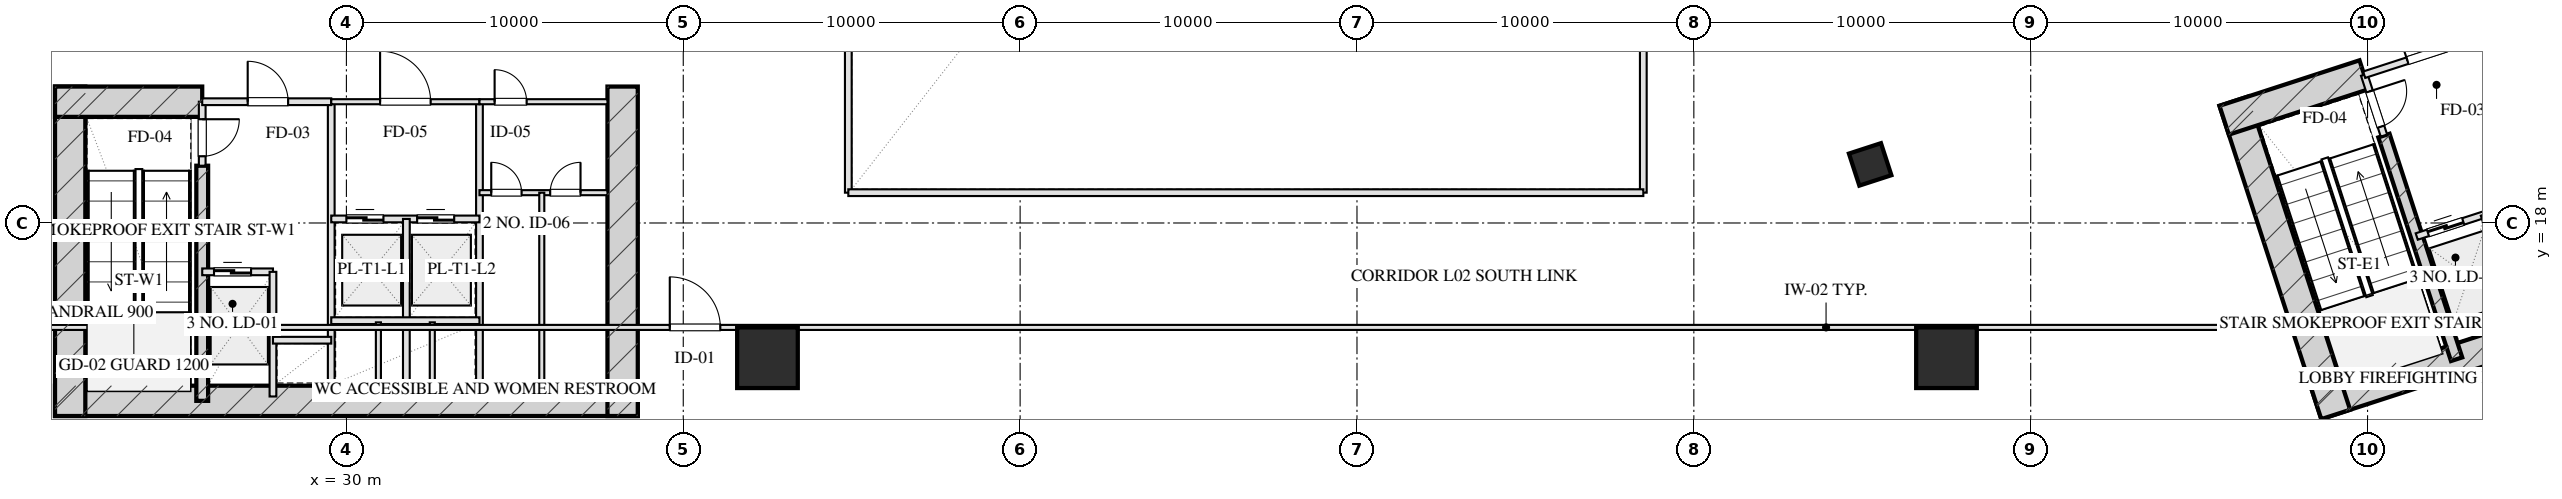
"""IFC4 building model, lengths in metres.
Left out: names, types, materials, properties, quantities, classifications, styles, units other than length and angle.
Written with IfcOpenShell. Run it as: python <this file> out.ifc"""

import sys

from ifc_helpers import new_model, si_unit, direction, frame, frame_2d, origin, origin_2d, place, context, subcontext, project, spatial, rectangle, hollow_rectangle, extrude, element, fill, save


model = new_model("IFC4")
c1 = context("Model", 3, precision=1e-05, world=origin(), true_north=direction((0.0, 1.0)))
c2 = subcontext(c1, "Body", "Model", "MODEL_VIEW")
j1 = project(units=[si_unit("LENGTHUNIT", "METRE"), si_unit("PLANEANGLEUNIT", "RADIAN")], contexts=[c1])
p1 = place(None, origin())
s1 = spatial("IfcSite", under=j1, at=p1, CompositionType="ELEMENT")
p2 = place(p1, origin())
s2 = spatial("IfcBuilding", under=s1, at=p2, CompositionType="ELEMENT")
p3 = place(p2, frame((0.0, 0.0, 11.5)))
s3 = spatial("IfcBuildingStorey", under=s2, at=p3, CompositionType="ELEMENT", Elevation=11.5)
p4 = place(p3, frame((21.35, 12.72, 0.0), z_axis=(0.0, 0.0, 1.0), x_axis=(1.0, 0.0, 0.0)))
e1 = element("IfcWall", 1, at=p4, inside=s3, PredefinedType="SHEAR", context=c2, shape_type="SweptSolid", body=[
    extrude(rectangle(XDim=17.3, YDim=0.9, at=frame_2d((8.65, 0.0))), origin(), (0.0, 0.0, 1.0), 5.0),
])
for number, where, z_axis, x_axis in (
    (2, (21.8, 22.05, 0.0), (0.0, 0.0, 1.0), (0.0, -1.0, 0.0)),
    (3, (38.2, 22.05, 0.0), (0.0, 0.0, 1.0), (0.0, -1.0, 0.0)),
):
    element("IfcWall", number, at=place(p3, frame(where, z_axis=z_axis, x_axis=x_axis)), inside=s3, PredefinedType="SHEAR", context=c2, shape_type="SweptSolid", body=[
        extrude(rectangle(XDim=9.78, YDim=0.9, at=frame_2d((4.89, 0.0))), origin(), (0.0, 0.0, 1.0), 5.0),
    ])
p5 = place(p3, frame((25.72, 19.7, 0.0), z_axis=(0.0, 0.0, 1.0), x_axis=(0.0, -1.0, 0.0)))
e4 = element("IfcWall", 4, at=p5, inside=s3, PredefinedType="SHEAR", context=c2, shape_type="SweptSolid", body=[
    extrude(rectangle(XDim=6.98, YDim=0.35, at=frame_2d((3.49, 0.0))), origin(), (0.0, 0.0, 1.0), 5.0),
])
p6 = place(p3, frame((21.35, 21.6, 0.0), z_axis=(0.0, 0.0, 1.0), x_axis=(1.0, 0.0, 0.0)))
e5 = element("IfcWall", 5, at=p6, inside=s3, PredefinedType="SHEAR", context=c2, shape_type="SweptSolid", body=[
    extrude(rectangle(XDim=4.37, YDim=0.9, at=frame_2d((2.185, 0.0))), origin(), (0.0, 0.0, 1.0), 5.0),
])
p7 = place(p3, frame((88.487, 12.605, 0.0), z_axis=(0.0, 0.0, 1.0), x_axis=(0.951055016115, 0.309021611416, 0.0)))
e6 = element("IfcWall", 6, at=p7, inside=s3, PredefinedType="SHEAR", context=c2, shape_type="SweptSolid", body=[
    extrude(rectangle(XDim=16.7, YDim=0.9, at=frame_2d((8.35, 0.0))), origin(), (0.0, 0.0, 1.0), 5.0),
])
p8 = place(p3, frame((86.032, 21.618, 0.0), z_axis=(0.0, 0.0, 1.0), x_axis=(0.30901438634, -0.951057363693, 0.0)))
e7 = element("IfcWall", 7, at=p8, inside=s3, PredefinedType="SHEAR", context=c2, shape_type="SweptSolid", body=[
    extrude(rectangle(XDim=9.78, YDim=0.9, at=frame_2d((4.89, 0.0))), origin(), (0.0, 0.0, 1.0), 5.0),
])
p9 = place(p3, frame((90.486, 20.594, 0.0), z_axis=(0.0, 0.0, 1.0), x_axis=(0.309020428229, -0.951055400562, 0.0)))
e8 = element("IfcWall", 8, at=p9, inside=s3, PredefinedType="SHEAR", context=c2, shape_type="SweptSolid", body=[
    extrude(rectangle(XDim=6.98, YDim=0.35, at=frame_2d((3.49, 0.0))), origin(), (0.0, 0.0, 1.0), 5.0),
])
p10 = place(p3, frame((85.743, 21.051, 0.0), z_axis=(0.0, 0.0, 1.0), x_axis=(0.951063623806, 0.308995118848, 0.0)))
e9 = element("IfcWall", 9, at=p10, inside=s3, PredefinedType="SHEAR", context=c2, shape_type="SweptSolid", body=[
    extrude(rectangle(XDim=4.37, YDim=0.9, at=frame_2d((2.185, 0.0))), origin(), (0.0, 0.0, 1.0), 5.0),
])
for number, where, z_axis, x_axis in (
    (10, (42.5, 14.0, 0.0), (0.0, 0.0, 1.0), (1.0, 0.0, 0.0)),
    (11, (77.5, 14.0, 0.0), (0.0, 0.0, 1.0), (1.0, 0.0, 0.0)),
):
    element("IfcColumn", number, at=place(p3, frame(where, z_axis=z_axis, x_axis=x_axis)), inside=s3, PredefinedType="COLUMN", context=c2, shape_type="SweptSolid", body=[
        extrude(hollow_rectangle(XDim=1.8, YDim=1.8, WallThickness=0.06, at=origin_2d()), origin(), (0.0, 0.0, 1.0), 5.001),
    ])
p11 = place(p3, frame((75.234, 19.739, 0.0), z_axis=(0.0, 0.0, 1.0), x_axis=(0.951056516295, 0.309016994375, 0.0)))
e12 = element("IfcColumn", 12, at=p11, inside=s3, PredefinedType="COLUMN", context=c2, shape_type="SweptSolid", body=[
    extrude(hollow_rectangle(XDim=1.0, YDim=1.0, WallThickness=0.036, at=origin_2d()), origin(), (0.0, 0.0, 1.0), 5.001),
])
p12 = place(p3, frame((25.72, 21.6, 0.0), z_axis=(0.0, 0.0, 1.0), x_axis=(0.0, -1.0, 0.0)))
e13 = element("IfcWall", 13, at=p12, inside=s3, PredefinedType="PARTITIONING", context=c2, shape_type="SweptSolid", body=[
    extrude(rectangle(XDim=1.9, YDim=0.2, at=frame_2d((0.95, 0.0))), origin(), (0.0, 0.0, 1.0), 4.685),
])
p13 = place(p12, frame((0.52, 0.0, 0.0)))
e14 = element("IfcOpeningElement", 14, at=p13, cuts=e13, PredefinedType="OPENING", context=c2, shape_type="SweptSolid", body=[
    extrude(rectangle(XDim=1.1, YDim=2.05, at=frame_2d((0.55, 1.025))), frame((0.0, 0.11, 0.0), z_axis=(0.0, -1.0, 0.0), x_axis=(1.0, 0.0, 0.0)), (0.0, 0.0, 1.0), 0.22),
])
p14 = place(p3, frame((29.55, 21.6, 0.0), z_axis=(0.0, 0.0, 1.0), x_axis=(0.0, -1.0, 0.0)))
e15 = element("IfcWall", 15, at=p14, inside=s3, PredefinedType="PARTITIONING", context=c2, shape_type="SweptSolid", body=[
    extrude(rectangle(XDim=8.43, YDim=0.2, at=frame_2d((4.215, 0.0))), origin(), (0.0, 0.0, 1.0), 4.685),
])
p15 = place(p3, frame((25.72, 21.6, 0.0), z_axis=(0.0, 0.0, 1.0), x_axis=(1.0, 0.0, 0.0)))
e16 = element("IfcWall", 16, at=p15, inside=s3, PredefinedType="PARTITIONING", context=c2, shape_type="SweptSolid", body=[
    extrude(rectangle(XDim=3.83, YDim=0.2, at=frame_2d((1.915, 0.0))), origin(), (0.0, 0.0, 1.0), 4.685),
])
p16 = place(p15, frame((1.35, 0.0, 0.0)))
e17 = element("IfcOpeningElement", 17, at=p16, cuts=e16, PredefinedType="OPENING", context=c2, shape_type="SweptSolid", body=[
    extrude(rectangle(XDim=1.2, YDim=2.05, at=frame_2d((0.6, 1.025))), frame((0.0, 0.11, 0.0), z_axis=(0.0, -1.0, 0.0), x_axis=(1.0, 0.0, 0.0)), (0.0, 0.0, 1.0), 0.22),
])
p17 = place(p3, frame((25.72, 16.55, 0.0), z_axis=(0.0, 0.0, 1.0), x_axis=(1.0, 0.0, 0.0)))
e18 = element("IfcWall", 18, at=p17, inside=s3, PredefinedType="PARTITIONING", context=c2, shape_type="SweptSolid", body=[
    extrude(rectangle(XDim=2.1, YDim=0.2, at=frame_2d((1.05, 0.0))), origin(), (0.0, 0.0, 1.0), 4.685),
])
p18 = place(p17, frame((0.35, 0.0, 0.0)))
e19 = element("IfcOpeningElement", 19, at=p18, cuts=e18, PredefinedType="OPENING", context=c2, shape_type="SweptSolid", body=[
    extrude(rectangle(XDim=1.1, YDim=2.05, at=frame_2d((0.55, 1.025))), frame((0.0, 0.11, 0.0), z_axis=(0.0, -1.0, 0.0), x_axis=(1.0, 0.0, 0.0)), (0.0, 0.0, 1.0), 0.22),
])
p19 = place(p3, frame((27.82, 16.55, 0.0), z_axis=(0.0, 0.0, 1.0), x_axis=(0.0, -1.0, 0.0)))
e20 = element("IfcWall", 20, at=p19, inside=s3, PredefinedType="PARTITIONING", context=c2, shape_type="SweptSolid", body=[
    extrude(rectangle(XDim=3.7, YDim=0.2, at=frame_2d((1.85, 0.0))), origin(), (0.0, 0.0, 1.0), 4.685),
])
p20 = place(p3, frame((27.82, 14.52, 0.0), z_axis=(0.0, 0.0, 1.0), x_axis=(1.0, 0.0, 0.0)))
e21 = element("IfcWall", 21, at=p20, inside=s3, PredefinedType="PARTITIONING", context=c2, shape_type="SweptSolid", body=[
    extrude(rectangle(XDim=1.73, YDim=0.2, at=frame_2d((0.865, 0.0))), origin(), (0.0, 0.0, 1.0), 4.685),
])
p21 = place(p3, frame((33.95, 21.6, 0.0), z_axis=(0.0, 0.0, 1.0), x_axis=(0.0, -1.0, 0.0)))
e22 = element("IfcWall", 22, at=p21, inside=s3, PredefinedType="PARTITIONING", context=c2, shape_type="SweptSolid", body=[
    extrude(rectangle(XDim=8.43, YDim=0.2, at=frame_2d((4.215, 0.0))), origin(), (0.0, 0.0, 1.0), 4.685),
])
p22 = place(p3, frame((29.55, 21.6, 0.0), z_axis=(0.0, 0.0, 1.0), x_axis=(1.0, 0.0, 0.0)))
e23 = element("IfcWall", 23, at=p22, inside=s3, PredefinedType="PARTITIONING", context=c2, shape_type="SweptSolid", body=[
    extrude(rectangle(XDim=4.4, YDim=0.15, at=frame_2d((2.2, 0.0))), origin(), (0.0, 0.0, 1.0), 4.685),
])
p23 = place(p22, frame((1.45, 0.0, 0.0)))
e24 = element("IfcOpeningElement", 24, at=p23, cuts=e23, PredefinedType="OPENING", context=c2, shape_type="SweptSolid", body=[
    extrude(rectangle(XDim=1.5, YDim=2.05, at=frame_2d((0.75, 1.025))), frame((0.0, 0.085, 0.0), z_axis=(0.0, -1.0, 0.0), x_axis=(1.0, 0.0, 0.0)), (0.0, 0.0, 1.0), 0.17),
])
p24 = place(p3, frame((29.55, 18.12, 0.0), z_axis=(0.0, 0.0, 1.0), x_axis=(1.0, 0.0, 0.0)))
e25 = element("IfcWall", 25, at=p24, inside=s3, PredefinedType="PARTITIONING", context=c2, shape_type="SweptSolid", body=[
    extrude(rectangle(XDim=4.4, YDim=0.2, at=frame_2d((2.2, 0.0))), origin(), (0.0, 0.0, 1.0), 4.685),
])
p25 = place(p24, frame((0.45, 0.0, 0.0)))
e26 = element("IfcOpeningElement", 26, at=p25, cuts=e25, PredefinedType="OPENING", context=c2, shape_type="SweptSolid", body=[
    extrude(rectangle(XDim=1.1, YDim=2.05, at=frame_2d((0.55, 1.025))), frame((0.0, 0.11, 0.0), z_axis=(0.0, -1.0, 0.0), x_axis=(1.0, 0.0, 0.0)), (0.0, 0.0, 1.0), 0.22),
])
p26 = place(p24, frame((2.55, 0.0, 0.0)))
e27 = element("IfcOpeningElement", 27, at=p26, cuts=e25, PredefinedType="OPENING", context=c2, shape_type="SweptSolid", body=[
    extrude(rectangle(XDim=1.1, YDim=2.05, at=frame_2d((0.55, 1.025))), frame((0.0, 0.11, 0.0), z_axis=(0.0, -1.0, 0.0), x_axis=(1.0, 0.0, 0.0)), (0.0, 0.0, 1.0), 0.22),
])
p27 = place(p3, frame((31.78, 18.12, 0.0), z_axis=(0.0, 0.0, 1.0), x_axis=(0.0, -1.0, 0.0)))
e28 = element("IfcWall", 28, at=p27, inside=s3, PredefinedType="PARTITIONING", context=c2, shape_type="SweptSolid", body=[
    extrude(rectangle(XDim=4.95, YDim=0.2, at=frame_2d((2.475, 0.0))), origin(), (0.0, 0.0, 1.0), 4.685),
])
p28 = place(p3, frame((29.55, 15.1, 0.0), z_axis=(0.0, 0.0, 1.0), x_axis=(1.0, 0.0, 0.0)))
e29 = element("IfcWall", 29, at=p28, inside=s3, PredefinedType="PARTITIONING", context=c2, shape_type="SweptSolid", body=[
    extrude(rectangle(XDim=4.4, YDim=0.2, at=frame_2d((2.2, 0.0))), origin(), (0.0, 0.0, 1.0), 4.685),
])
for number, where, z_axis, x_axis in (
    (30, (30.95, 15.05, 0.0), (0.0, 0.0, 1.0), (0.0, -1.0, 0.0)),
    (31, (32.55, 15.05, 0.0), (0.0, 0.0, 1.0), (0.0, -1.0, 0.0)),
):
    element("IfcWall", number, at=place(p3, frame(where, z_axis=z_axis, x_axis=x_axis)), inside=s3, PredefinedType="PARTITIONING", context=c2, shape_type="SweptSolid", body=[
        extrude(rectangle(XDim=1.88, YDim=0.15, at=frame_2d((0.94, 0.0))), origin(), (0.0, 0.0, 1.0), 4.685),
    ])
p29 = place(p3, frame((33.95, 21.6, 0.0), z_axis=(0.0, 0.0, 1.0), x_axis=(1.0, 0.0, 0.0)))
e32 = element("IfcWall", 32, at=p29, inside=s3, PredefinedType="PARTITIONING", context=c2, shape_type="SweptSolid", body=[
    extrude(rectangle(XDim=3.8, YDim=0.15, at=frame_2d((1.9, 0.0))), origin(), (0.0, 0.0, 1.0), 4.685),
])
p30 = place(p29, frame((0.45, 0.0, 0.0)))
e33 = element("IfcOpeningElement", 33, at=p30, cuts=e32, PredefinedType="OPENING", context=c2, shape_type="SweptSolid", body=[
    extrude(rectangle(XDim=0.95, YDim=2.05, at=frame_2d((0.475, 1.025))), frame((0.0, 0.085, 0.0), z_axis=(0.0, -1.0, 0.0), x_axis=(1.0, 0.0, 0.0)), (0.0, 0.0, 1.0), 0.17),
])
p31 = place(p3, frame((33.95, 18.9, 0.0), z_axis=(0.0, 0.0, 1.0), x_axis=(1.0, 0.0, 0.0)))
e34 = element("IfcWall", 34, at=p31, inside=s3, PredefinedType="PARTITIONING", context=c2, shape_type="SweptSolid", body=[
    extrude(rectangle(XDim=3.8, YDim=0.15, at=frame_2d((1.9, 0.0))), origin(), (0.0, 0.0, 1.0), 4.685),
])
p32 = place(p31, frame((0.35, 0.0, 0.0)))
e35 = element("IfcOpeningElement", 35, at=p32, cuts=e34, PredefinedType="OPENING", context=c2, shape_type="SweptSolid", body=[
    extrude(rectangle(XDim=0.9, YDim=2.05, at=frame_2d((0.45, 1.025))), frame((0.0, 0.085, 0.0), z_axis=(0.0, -1.0, 0.0), x_axis=(1.0, 0.0, 0.0)), (0.0, 0.0, 1.0), 0.17),
])
p33 = place(p31, frame((2.1, 0.0, 0.0)))
e36 = element("IfcOpeningElement", 36, at=p33, cuts=e34, PredefinedType="OPENING", context=c2, shape_type="SweptSolid", body=[
    extrude(rectangle(XDim=0.9, YDim=2.05, at=frame_2d((0.45, 1.025))), frame((0.0, 0.085, 0.0), z_axis=(0.0, -1.0, 0.0), x_axis=(1.0, 0.0, 0.0)), (0.0, 0.0, 1.0), 0.17),
])
p34 = place(p3, frame((35.8, 18.9, 0.0), z_axis=(0.0, 0.0, 1.0), x_axis=(0.0, -1.0, 0.0)))
e37 = element("IfcWall", 37, at=p34, inside=s3, PredefinedType="PARTITIONING", context=c2, shape_type="SweptSolid", body=[
    extrude(rectangle(XDim=5.73, YDim=0.15, at=frame_2d((2.865, 0.0))), origin(), (0.0, 0.0, 1.0), 4.685),
])
p35 = place(p3, frame((89.899, 22.401, 0.0), z_axis=(0.0, 0.0, 1.0), x_axis=(0.308932062672, -0.951084108086, 0.0)))
e38 = element("IfcWall", 38, at=p35, inside=s3, PredefinedType="PARTITIONING", context=c2, shape_type="SweptSolid", body=[
    extrude(rectangle(XDim=1.9, YDim=0.2, at=frame_2d((0.95, 0.0))), origin(), (0.0, 0.0, 1.0), 4.685),
])
p36 = place(p35, frame((0.52, 0.0, 0.0)))
e39 = element("IfcOpeningElement", 39, at=p36, cuts=e38, PredefinedType="OPENING", context=c2, shape_type="SweptSolid", body=[
    extrude(rectangle(XDim=1.1, YDim=2.05, at=frame_2d((0.55, 1.025))), frame((0.0, 0.11, 0.0), z_axis=(0.0, -1.0, 0.0), x_axis=(1.0, 0.0, 0.0)), (0.0, 0.0, 1.0), 0.22),
])
p37 = place(p3, frame((89.899, 22.401, 0.0), z_axis=(0.0, 0.0, 1.0), x_axis=(0.951046716504, 0.309047153403, 0.0)))
e40 = element("IfcWall", 40, at=p37, inside=s3, PredefinedType="PARTITIONING", context=c2, shape_type="SweptSolid", body=[
    extrude(rectangle(XDim=3.83, YDim=0.2, at=frame_2d((1.915, 0.0))), origin(), (0.0, 0.0, 1.0), 4.685),
])
p38 = place(p37, frame((1.35, 0.0, 0.0)))
e41 = element("IfcOpeningElement", 41, at=p38, cuts=e40, PredefinedType="OPENING", context=c2, shape_type="SweptSolid", body=[
    extrude(rectangle(XDim=1.2, YDim=2.05, at=frame_2d((0.6, 1.025))), frame((0.0, 0.11, 0.0), z_axis=(0.0, -1.0, 0.0), x_axis=(1.0, 0.0, 0.0)), (0.0, 0.0, 1.0), 0.22),
])
p39 = place(p3, frame((91.46, 17.598, 0.0), z_axis=(0.0, 0.0, 1.0), x_axis=(0.951062257173, 0.308999325213, 0.0)))
e42 = element("IfcWall", 42, at=p39, inside=s3, PredefinedType="PARTITIONING", context=c2, shape_type="SweptSolid", body=[
    extrude(rectangle(XDim=2.1, YDim=0.2, at=frame_2d((1.05, 0.0))), origin(), (0.0, 0.0, 1.0), 4.685),
])
p40 = place(p39, frame((0.35, 0.0, 0.0)))
e43 = element("IfcOpeningElement", 43, at=p40, cuts=e42, PredefinedType="OPENING", context=c2, shape_type="SweptSolid", body=[
    extrude(rectangle(XDim=1.1, YDim=2.05, at=frame_2d((0.55, 1.025))), frame((0.0, 0.11, 0.0), z_axis=(0.0, -1.0, 0.0), x_axis=(1.0, 0.0, 0.0)), (0.0, 0.0, 1.0), 0.22),
])
p41 = place(p3, frame((93.457, 18.247, 0.0), z_axis=(0.0, 0.0, 1.0), x_axis=(0.3089935693, -0.951064127245, 0.0)))
e44 = element("IfcWall", 44, at=p41, inside=s3, PredefinedType="PARTITIONING", context=c2, shape_type="SweptSolid", body=[
    extrude(rectangle(XDim=3.7, YDim=0.2, at=frame_2d((1.85, 0.0))), origin(), (0.0, 0.0, 1.0), 4.685),
])
for number, where, z_axis, x_axis in (
    (45, (44.9, 18.9, 0.0), (0.0, 0.0, 1.0), (0.0, 1.0, 0.0)),
    (46, (68.5, 18.9, 0.0), (0.0, 0.0, 1.0), (0.0, 1.0, 0.0)),
):
    element("IfcWall", number, at=place(p3, frame(where, z_axis=z_axis, x_axis=x_axis)), inside=s3, PredefinedType="PARTITIONING", context=c2, shape_type="SweptSolid", body=[
        extrude(rectangle(XDim=30.2, YDim=0.2, at=frame_2d((15.1, 0.0))), origin(), (0.0, 0.0, 1.0), 4.685),
    ])
p42 = place(p3, frame((44.9, 18.9, 0.0), z_axis=(0.0, 0.0, 1.0), x_axis=(1.0, 0.0, 0.0)))
e47 = element("IfcWall", 47, at=p42, inside=s3, PredefinedType="PARTITIONING", context=c2, shape_type="SweptSolid", body=[
    extrude(rectangle(XDim=23.6, YDim=0.2, at=frame_2d((11.8, 0.0))), origin(), (0.0, 0.0, 1.0), 4.685),
])
p43 = place(p3, frame((18.0, 14.9, 0.0), z_axis=(0.0, 0.0, 1.0), x_axis=(1.0, 0.0, 0.0)))
e48 = element("IfcWall", 48, at=p43, inside=s3, PredefinedType="PARTITIONING", context=c2, shape_type="SweptSolid", body=[
    extrude(rectangle(XDim=88.0, YDim=0.15, at=frame_2d((44.0, 0.0))), origin(), (0.0, 0.0, 1.0), 2.15),
])
p44 = place(p43, frame((21.6, 0.0, 0.0)))
e49 = element("IfcOpeningElement", 49, at=p44, cuts=e48, PredefinedType="OPENING", context=c2, shape_type="SweptSolid", body=[
    extrude(rectangle(XDim=1.5, YDim=2.05, at=frame_2d((0.75, 1.025))), frame((0.0, 0.085, 0.0), z_axis=(0.0, -1.0, 0.0), x_axis=(1.0, 0.0, 0.0)), (0.0, 0.0, 1.0), 0.17),
])
p45 = place(p13, origin())
e50 = element("IfcDoor", 50, at=p45, inside=s3, OperationType="SINGLE_SWING_LEFT", PredefinedType="DOOR", context=c2, shape_type="SweptSolid", body=[
    extrude(rectangle(XDim=1.1, YDim=2.05, at=frame_2d((0.55, 1.025))), frame((0.0, 0.025, 0.0), z_axis=(0.0, -1.0, 0.0), x_axis=(1.0, 0.0, 0.0)), (0.0, 0.0, 1.0), 0.05),
])
fill(e14, e50)
p46 = place(p16, origin())
e51 = element("IfcDoor", 51, at=p46, inside=s3, OperationType="SINGLE_SWING_LEFT", PredefinedType="DOOR", context=c2, shape_type="SweptSolid", body=[
    extrude(rectangle(XDim=1.2, YDim=2.05, at=frame_2d((0.6, 1.025))), frame((0.0, 0.025, 0.0), z_axis=(0.0, -1.0, 0.0), x_axis=(1.0, 0.0, 0.0)), (0.0, 0.0, 1.0), 0.05),
])
fill(e17, e51)
p47 = place(p18, origin())
e52 = element("IfcDoor", 52, at=p47, inside=s3, OperationType="DOUBLE_DOOR_SLIDING", PredefinedType="DOOR", context=c2, shape_type="SweptSolid", body=[
    extrude(rectangle(XDim=1.1, YDim=2.05, at=frame_2d((0.55, 1.025))), frame((0.0, 0.025, 0.0), z_axis=(0.0, -1.0, 0.0), x_axis=(1.0, 0.0, 0.0)), (0.0, 0.0, 1.0), 0.05),
])
fill(e19, e52)
p48 = place(p23, origin())
e53 = element("IfcDoor", 53, at=p48, inside=s3, OperationType="SINGLE_SWING_LEFT", PredefinedType="DOOR", context=c2, shape_type="SweptSolid", body=[
    extrude(rectangle(XDim=1.5, YDim=2.05, at=frame_2d((0.75, 1.025))), frame((0.0, 0.025, 0.0), z_axis=(0.0, -1.0, 0.0), x_axis=(1.0, 0.0, 0.0)), (0.0, 0.0, 1.0), 0.05),
])
fill(e24, e53)
p49 = place(p25, origin())
e54 = element("IfcDoor", 54, at=p49, inside=s3, OperationType="DOUBLE_DOOR_SLIDING", PredefinedType="DOOR", context=c2, shape_type="SweptSolid", body=[
    extrude(rectangle(XDim=1.1, YDim=2.05, at=frame_2d((0.55, 1.025))), frame((0.0, 0.025, 0.0), z_axis=(0.0, -1.0, 0.0), x_axis=(1.0, 0.0, 0.0)), (0.0, 0.0, 1.0), 0.05),
])
fill(e26, e54)
p50 = place(p26, origin())
e55 = element("IfcDoor", 55, at=p50, inside=s3, OperationType="DOUBLE_DOOR_SLIDING", PredefinedType="DOOR", context=c2, shape_type="SweptSolid", body=[
    extrude(rectangle(XDim=1.1, YDim=2.05, at=frame_2d((0.55, 1.025))), frame((0.0, 0.025, 0.0), z_axis=(0.0, -1.0, 0.0), x_axis=(1.0, 0.0, 0.0)), (0.0, 0.0, 1.0), 0.05),
])
fill(e27, e55)
p51 = place(p30, origin())
e56 = element("IfcDoor", 56, at=p51, inside=s3, OperationType="SINGLE_SWING_LEFT", PredefinedType="DOOR", context=c2, shape_type="SweptSolid", body=[
    extrude(rectangle(XDim=0.95, YDim=2.05, at=frame_2d((0.475, 1.025))), frame((0.0, 0.025, 0.0), z_axis=(0.0, -1.0, 0.0), x_axis=(1.0, 0.0, 0.0)), (0.0, 0.0, 1.0), 0.05),
])
fill(e33, e56)
p52 = place(p32, origin())
e57 = element("IfcDoor", 57, at=p52, inside=s3, OperationType="SINGLE_SWING_LEFT", PredefinedType="DOOR", context=c2, shape_type="SweptSolid", body=[
    extrude(rectangle(XDim=0.9, YDim=2.05, at=frame_2d((0.45, 1.025))), frame((0.0, 0.025, 0.0), z_axis=(0.0, -1.0, 0.0), x_axis=(1.0, 0.0, 0.0)), (0.0, 0.0, 1.0), 0.05),
])
fill(e35, e57)
p53 = place(p33, origin())
e58 = element("IfcDoor", 58, at=p53, inside=s3, OperationType="SINGLE_SWING_RIGHT", PredefinedType="DOOR", context=c2, shape_type="SweptSolid", body=[
    extrude(rectangle(XDim=0.9, YDim=2.05, at=frame_2d((0.45, 1.025))), frame((0.0, 0.025, 0.0), z_axis=(0.0, -1.0, 0.0), x_axis=(1.0, 0.0, 0.0)), (0.0, 0.0, 1.0), 0.05),
])
fill(e36, e58)
p54 = place(p36, origin())
e59 = element("IfcDoor", 59, at=p54, inside=s3, OperationType="SINGLE_SWING_LEFT", PredefinedType="DOOR", context=c2, shape_type="SweptSolid", body=[
    extrude(rectangle(XDim=1.1, YDim=2.05, at=frame_2d((0.55, 1.025))), frame((0.0, 0.025, 0.0), z_axis=(0.0, -1.0, 0.0), x_axis=(1.0, 0.0, 0.0)), (0.0, 0.0, 1.0), 0.05),
])
fill(e39, e59)
p55 = place(p38, origin())
e60 = element("IfcDoor", 60, at=p55, inside=s3, OperationType="SINGLE_SWING_LEFT", PredefinedType="DOOR", context=c2, shape_type="SweptSolid", body=[
    extrude(rectangle(XDim=1.2, YDim=2.05, at=frame_2d((0.6, 1.025))), frame((0.0, 0.025, 0.0), z_axis=(0.0, -1.0, 0.0), x_axis=(1.0, 0.0, 0.0)), (0.0, 0.0, 1.0), 0.05),
])
fill(e41, e60)
p56 = place(p40, origin())
e61 = element("IfcDoor", 61, at=p56, inside=s3, OperationType="DOUBLE_DOOR_SLIDING", PredefinedType="DOOR", context=c2, shape_type="SweptSolid", body=[
    extrude(rectangle(XDim=1.1, YDim=2.05, at=frame_2d((0.55, 1.025))), frame((0.0, 0.025, 0.0), z_axis=(0.0, -1.0, 0.0), x_axis=(1.0, 0.0, 0.0)), (0.0, 0.0, 1.0), 0.05),
])
fill(e43, e61)
p57 = place(p44, origin())
e62 = element("IfcDoor", 62, at=p57, inside=s3, OperationType="SINGLE_SWING_LEFT", PredefinedType="DOOR", context=c2, shape_type="SweptSolid", body=[
    extrude(rectangle(XDim=1.5, YDim=2.05, at=frame_2d((0.75, 1.025))), frame((0.0, 0.025, 0.0), z_axis=(0.0, -1.0, 0.0), x_axis=(1.0, 0.0, 0.0)), (0.0, 0.0, 1.0), 0.05),
])
fill(e49, e62)
save(model, sys.argv[1])
